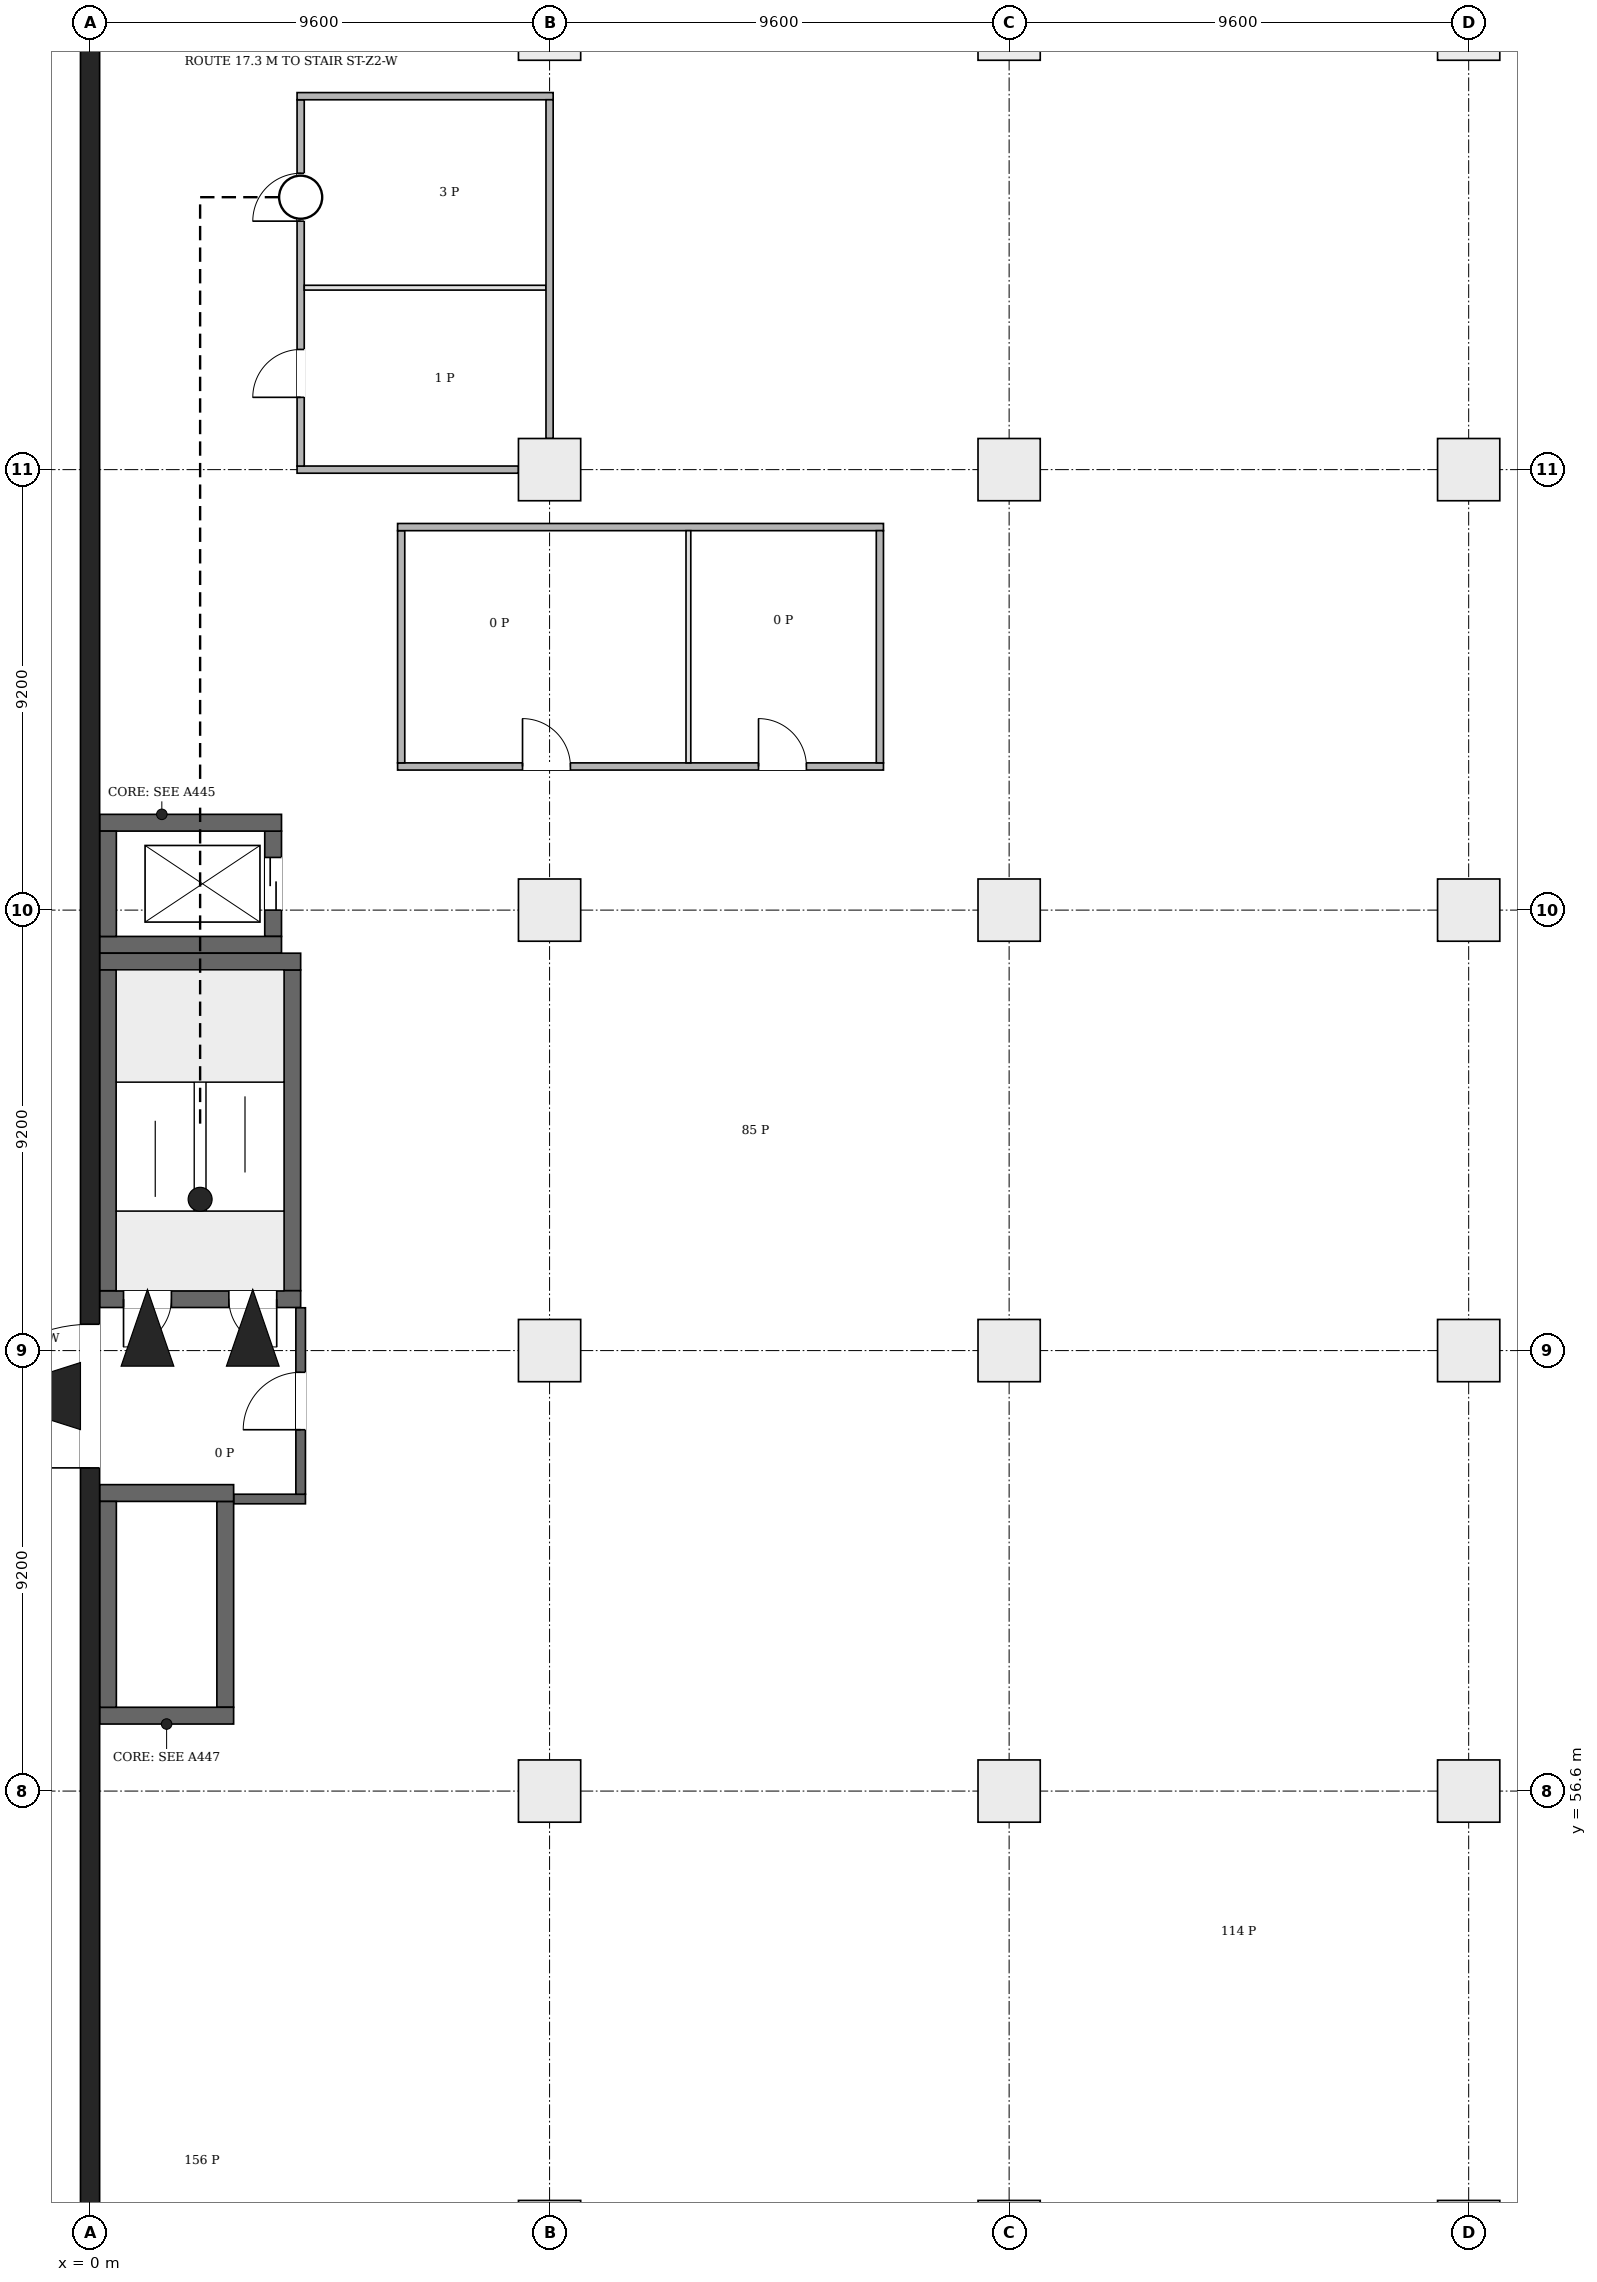
"""IFC4 building model, lengths in metres.
Left out: names, types, materials, properties, quantities, classifications, styles, units other than length and angle.
Written with IfcOpenShell. Run it as: python <this file> out.ifc"""

import sys

from ifc_helpers import new_model, si_unit, direction, frame, frame_2d, origin, origin_2d, place, context, subcontext, project, spatial, rectangle, extrude, element, fill, save


model = new_model("IFC4")
c1 = context("Model", 3, precision=1e-05, world=origin(), true_north=direction((0.0, 1.0)))
c2 = subcontext(c1, "Body", "Model", "MODEL_VIEW")
j1 = project(units=[si_unit("LENGTHUNIT", "METRE"), si_unit("PLANEANGLEUNIT", "RADIAN")], contexts=[c1])
p1 = place(None, origin())
s1 = spatial("IfcSite", under=j1, at=p1, CompositionType="ELEMENT")
p2 = place(p1, origin())
s2 = spatial("IfcBuilding", under=s1, at=p2, CompositionType="ELEMENT")
p3 = place(p2, origin())
s3 = spatial("IfcBuildingStorey", under=s2, at=p3, CompositionType="ELEMENT", Elevation=0.0)
p4 = place(p3, frame((0.0, 46.72, 0.0), z_axis=(0.0, 0.0, 1.0), x_axis=(0.0, 1.0, 0.0)))
e1 = element("IfcWall", 1, at=p4, inside=s3, PredefinedType="SHEAR", context=c2, shape_type="SweptSolid", body=[
    extrude(rectangle(XDim=47.36, YDim=0.4, at=frame_2d((23.68, 0.0))), origin(), (0.0, 0.0, 1.0), 6.5),
])
p5 = place(p4, frame((16.63, 0.0, 0.0)))
e2 = element("IfcOpeningElement", 2, at=p5, cuts=e1, PredefinedType="OPENING", context=c2, shape_type="SweptSolid", body=[
    extrude(rectangle(XDim=3.0, YDim=2.4, at=frame_2d((1.5, 1.2))), frame((0.0, 0.21, 0.0), z_axis=(0.0, -1.0, 0.0), x_axis=(1.0, 0.0, 0.0)), (0.0, 0.0, 1.0), 0.42),
])
p6 = place(p3, frame((0.2, 66.875, 0.0), z_axis=(0.0, 0.0, 1.0), x_axis=(1.0, 0.0, 0.0)))
e3 = element("IfcWall", 3, at=p6, inside=s3, PredefinedType="SHEAR", context=c2, shape_type="SweptSolid", body=[
    extrude(rectangle(XDim=4.2, YDim=0.35, at=frame_2d((2.1, 0.0))), origin(), (0.0, 0.0, 1.0), 6.5),
])
p7 = place(p6, frame((0.5, 0.0, 0.0)))
e4 = element("IfcOpeningElement", 4, at=p7, cuts=e3, PredefinedType="OPENING", context=c2, shape_type="SweptSolid", body=[
    extrude(rectangle(XDim=1.0, YDim=2.1, at=frame_2d((0.5, 1.05))), frame((0.0, 0.185, 0.0), z_axis=(0.0, -1.0, 0.0), x_axis=(1.0, 0.0, 0.0)), (0.0, 0.0, 1.0), 0.37),
])
p8 = place(p6, frame((2.7, 0.0, 0.0)))
e5 = element("IfcOpeningElement", 5, at=p8, cuts=e3, PredefinedType="OPENING", context=c2, shape_type="SweptSolid", body=[
    extrude(rectangle(XDim=1.0, YDim=2.1, at=frame_2d((0.5, 1.05))), frame((0.0, 0.185, 0.0), z_axis=(0.0, -1.0, 0.0), x_axis=(1.0, 0.0, 0.0)), (0.0, 0.0, 1.0), 0.37),
])
p9 = place(p3, frame((0.2, 73.925, 0.0), z_axis=(0.0, 0.0, 1.0), x_axis=(1.0, 0.0, 0.0)))
e6 = element("IfcWall", 6, at=p9, inside=s3, PredefinedType="SHEAR", context=c2, shape_type="SweptSolid", body=[
    extrude(rectangle(XDim=4.2, YDim=0.35, at=frame_2d((2.1, 0.0))), origin(), (0.0, 0.0, 1.0), 6.5),
])
for number, where, z_axis, x_axis in (
    (7, (0.375, 67.05, 0.0), (0.0, 0.0, 1.0), (0.0, 1.0, 0.0)),
    (8, (4.225, 67.05, 0.0), (0.0, 0.0, 1.0), (0.0, 1.0, 0.0)),
):
    element("IfcWall", number, at=place(p3, frame(where, z_axis=z_axis, x_axis=x_axis)), inside=s3, PredefinedType="SHEAR", context=c2, shape_type="SweptSolid", body=[
        extrude(rectangle(XDim=6.7, YDim=0.35, at=frame_2d((3.35, 0.0))), origin(), (0.0, 0.0, 1.0), 6.5),
    ])
for number, where, z_axis, x_axis in (
    (9, (0.2, 74.275, 0.0), (0.0, 0.0, 1.0), (1.0, 0.0, 0.0)),
    (10, (0.2, 76.825, 0.0), (0.0, 0.0, 1.0), (1.0, 0.0, 0.0)),
):
    element("IfcWall", number, at=place(p3, frame(where, z_axis=z_axis, x_axis=x_axis)), inside=s3, PredefinedType="SHEAR", context=c2, shape_type="SweptSolid", body=[
        extrude(rectangle(XDim=3.8, YDim=0.35, at=frame_2d((1.9, 0.0))), origin(), (0.0, 0.0, 1.0), 6.5),
    ])
p10 = place(p3, frame((0.375, 74.45, 0.0), z_axis=(0.0, 0.0, 1.0), x_axis=(0.0, 1.0, 0.0)))
e11 = element("IfcWall", 11, at=p10, inside=s3, PredefinedType="SHEAR", context=c2, shape_type="SweptSolid", body=[
    extrude(rectangle(XDim=2.2, YDim=0.35, at=frame_2d((1.1, 0.0))), origin(), (0.0, 0.0, 1.0), 6.5),
])
p11 = place(p3, frame((3.825, 74.45, 0.0), z_axis=(0.0, 0.0, 1.0), x_axis=(0.0, 1.0, 0.0)))
e12 = element("IfcWall", 12, at=p11, inside=s3, PredefinedType="SHEAR", context=c2, shape_type="SweptSolid", body=[
    extrude(rectangle(XDim=2.2, YDim=0.35, at=frame_2d((1.1, 0.0))), origin(), (0.0, 0.0, 1.0), 6.5),
])
p12 = place(p11, frame((0.55, 0.0, 0.0)))
e13 = element("IfcOpeningElement", 13, at=p12, cuts=e12, PredefinedType="OPENING", context=c2, shape_type="SweptSolid", body=[
    extrude(rectangle(XDim=1.1, YDim=2.1, at=frame_2d((0.55, 1.05))), frame((0.0, 0.185, 0.0), z_axis=(0.0, -1.0, 0.0), x_axis=(1.0, 0.0, 0.0)), (0.0, 0.0, 1.0), 0.37),
])
for number, where, z_axis, x_axis in (
    (14, (0.2, 58.175, 0.0), (0.0, 0.0, 1.0), (1.0, 0.0, 0.0)),
    (15, (0.2, 62.825, 0.0), (0.0, 0.0, 1.0), (1.0, 0.0, 0.0)),
):
    element("IfcWall", number, at=place(p3, frame(where, z_axis=z_axis, x_axis=x_axis)), inside=s3, PredefinedType="SHEAR", context=c2, shape_type="SweptSolid", body=[
        extrude(rectangle(XDim=2.8, YDim=0.35, at=frame_2d((1.4, 0.0))), origin(), (0.0, 0.0, 1.0), 6.5),
    ])
for number, where, z_axis, x_axis in (
    (16, (0.375, 58.35, 0.0), (0.0, 0.0, 1.0), (0.0, 1.0, 0.0)),
    (17, (2.825, 58.35, 0.0), (0.0, 0.0, 1.0), (0.0, 1.0, 0.0)),
):
    element("IfcWall", number, at=place(p3, frame(where, z_axis=z_axis, x_axis=x_axis)), inside=s3, PredefinedType="SHEAR", context=c2, shape_type="SweptSolid", body=[
        extrude(rectangle(XDim=4.3, YDim=0.35, at=frame_2d((2.15, 0.0))), origin(), (0.0, 0.0, 1.0), 6.5),
    ])
for number, where, z_axis, x_axis in (
    (18, (9.6, 47.4, 0.0), (0.0, 0.0, 1.0), (1.0, 0.0, 0.0)),
    (19, (19.2, 47.4, 0.0), (0.0, 0.0, 1.0), (1.0, 0.0, 0.0)),
    (20, (28.8, 47.4, 0.0), (0.0, 0.0, 1.0), (1.0, 0.0, 0.0)),
    (21, (9.6, 56.6, 0.0), (0.0, 0.0, 1.0), (1.0, 0.0, 0.0)),
    (22, (19.2, 56.6, 0.0), (0.0, 0.0, 1.0), (1.0, 0.0, 0.0)),
    (23, (28.8, 56.6, 0.0), (0.0, 0.0, 1.0), (1.0, 0.0, 0.0)),
    (24, (9.6, 65.8, 0.0), (0.0, 0.0, 1.0), (1.0, 0.0, 0.0)),
    (25, (19.2, 65.8, 0.0), (0.0, 0.0, 1.0), (1.0, 0.0, 0.0)),
    (26, (28.8, 65.8, 0.0), (0.0, 0.0, 1.0), (1.0, 0.0, 0.0)),
    (27, (9.6, 75.0, 0.0), (0.0, 0.0, 1.0), (1.0, 0.0, 0.0)),
    (28, (19.2, 75.0, 0.0), (0.0, 0.0, 1.0), (1.0, 0.0, 0.0)),
    (29, (28.8, 75.0, 0.0), (0.0, 0.0, 1.0), (1.0, 0.0, 0.0)),
    (30, (9.6, 84.2, 0.0), (0.0, 0.0, 1.0), (1.0, 0.0, 0.0)),
    (31, (19.2, 84.2, 0.0), (0.0, 0.0, 1.0), (1.0, 0.0, 0.0)),
    (32, (28.8, 84.2, 0.0), (0.0, 0.0, 1.0), (1.0, 0.0, 0.0)),
    (33, (9.6, 93.4, 0.0), (0.0, 0.0, 1.0), (1.0, 0.0, 0.0)),
    (34, (19.2, 93.4, 0.0), (0.0, 0.0, 1.0), (1.0, 0.0, 0.0)),
    (35, (28.8, 93.4, 0.0), (0.0, 0.0, 1.0), (1.0, 0.0, 0.0)),
):
    element("IfcColumn", number, at=place(p3, frame(where, z_axis=z_axis, x_axis=x_axis)), inside=s3, PredefinedType="COLUMN", context=c2, shape_type="SweptSolid", body=[
        extrude(rectangle(XDim=1.3, YDim=1.3, at=origin_2d()), origin(), (0.0, 0.0, 1.0), 6.5),
    ])
p13 = place(p3, frame((3.006, 62.7, 0.0), z_axis=(0.0, 0.0, 1.0), x_axis=(1.0, 0.0, 0.0)))
e36 = element("IfcWall", 36, at=p13, inside=s3, PredefinedType="PARTITIONING", context=c2, shape_type="SweptSolid", body=[
    extrude(rectangle(XDim=1.494, YDim=0.2, at=frame_2d((0.747, 0.0))), origin(), (0.0, 0.0, 1.0), 6.05),
])
p14 = place(p3, frame((4.4, 62.8, 0.0), z_axis=(0.0, 0.0, 1.0), x_axis=(0.0, 1.0, 0.0)))
e37 = element("IfcWall", 37, at=p14, inside=s3, PredefinedType="PARTITIONING", context=c2, shape_type="SweptSolid", body=[
    extrude(rectangle(XDim=3.894, YDim=0.2, at=frame_2d((1.947, 0.0))), origin(), (0.0, 0.0, 1.0), 6.05),
])
p15 = place(p14, frame((1.347, 0.0, 0.0)))
e38 = element("IfcOpeningElement", 38, at=p15, cuts=e37, PredefinedType="OPENING", context=c2, shape_type="SweptSolid", body=[
    extrude(rectangle(XDim=1.2, YDim=2.1, at=frame_2d((0.6, 1.05))), frame((0.0, 0.11, 0.0), z_axis=(0.0, -1.0, 0.0), x_axis=(1.0, 0.0, 0.0)), (0.0, 0.0, 1.0), 0.22),
])
p16 = place(p3, frame((4.325, 84.2, 0.0), z_axis=(0.0, 0.0, 1.0), x_axis=(1.0, 0.0, 0.0)))
e39 = element("IfcWall", 39, at=p16, inside=s3, PredefinedType="PARTITIONING", context=c2, shape_type="SweptSolid", body=[
    extrude(rectangle(XDim=4.625, YDim=0.15, at=frame_2d((2.312, 0.0))), origin(), (0.0, 0.0, 1.0), 5.65),
])
p17 = place(p3, frame((4.4, 84.275, 0.0), z_axis=(0.0, 0.0, 1.0), x_axis=(0.0, 1.0, 0.0)))
e40 = element("IfcWall", 40, at=p17, inside=s3, PredefinedType="PARTITIONING", context=c2, shape_type="SweptSolid", body=[
    extrude(rectangle(XDim=7.65, YDim=0.15, at=frame_2d((3.825, 0.0))), origin(), (0.0, 0.0, 1.0), 6.05),
])
p18 = place(p17, frame((1.435, 0.0, 0.0)))
e41 = element("IfcOpeningElement", 41, at=p18, cuts=e40, PredefinedType="OPENING", context=c2, shape_type="SweptSolid", body=[
    extrude(rectangle(XDim=1.0, YDim=2.1, at=frame_2d((0.5, 1.05))), frame((0.0, 0.085, 0.0), z_axis=(0.0, -1.0, 0.0), x_axis=(1.0, 0.0, 0.0)), (0.0, 0.0, 1.0), 0.17),
])
p19 = place(p17, frame((5.115, 0.0, 0.0)))
e42 = element("IfcOpeningElement", 42, at=p19, cuts=e40, PredefinedType="OPENING", context=c2, shape_type="SweptSolid", body=[
    extrude(rectangle(XDim=1.0, YDim=2.1, at=frame_2d((0.5, 1.05))), frame((0.0, 0.085, 0.0), z_axis=(0.0, -1.0, 0.0), x_axis=(1.0, 0.0, 0.0)), (0.0, 0.0, 1.0), 0.17),
])
p20 = place(p3, frame((4.325, 92.0, 0.0), z_axis=(0.0, 0.0, 1.0), x_axis=(1.0, 0.0, 0.0)))
e43 = element("IfcWall", 43, at=p20, inside=s3, PredefinedType="PARTITIONING", context=c2, shape_type="SweptSolid", body=[
    extrude(rectangle(XDim=5.35, YDim=0.15, at=frame_2d((2.675, 0.0))), origin(), (0.0, 0.0, 1.0), 6.05),
])
p21 = place(p3, frame((4.475, 88.0, 0.0), z_axis=(0.0, 0.0, 1.0), x_axis=(1.0, 0.0, 0.0)))
e44 = element("IfcWall", 44, at=p21, inside=s3, PredefinedType="PARTITIONING", context=c2, shape_type="SweptSolid", body=[
    extrude(rectangle(XDim=5.05, YDim=0.1, at=frame_2d((2.525, 0.0))), origin(), (0.0, 0.0, 1.0), 6.05),
])
p22 = place(p3, frame((6.425, 78.0, 0.0), z_axis=(0.0, 0.0, 1.0), x_axis=(1.0, 0.0, 0.0)))
e45 = element("IfcWall", 45, at=p22, inside=s3, PredefinedType="PARTITIONING", context=c2, shape_type="SweptSolid", body=[
    extrude(rectangle(XDim=10.15, YDim=0.15, at=frame_2d((5.075, 0.0))), origin(), (0.0, 0.0, 1.0), 6.05),
])
p23 = place(p22, frame((2.61, 0.0, 0.0)))
e46 = element("IfcOpeningElement", 46, at=p23, cuts=e45, PredefinedType="OPENING", context=c2, shape_type="SweptSolid", body=[
    extrude(rectangle(XDim=1.0, YDim=2.1, at=frame_2d((0.5, 1.05))), frame((0.0, 0.085, 0.0), z_axis=(0.0, -1.0, 0.0), x_axis=(1.0, 0.0, 0.0)), (0.0, 0.0, 1.0), 0.17),
])
p24 = place(p22, frame((7.54, 0.0, 0.0)))
e47 = element("IfcOpeningElement", 47, at=p24, cuts=e45, PredefinedType="OPENING", context=c2, shape_type="SweptSolid", body=[
    extrude(rectangle(XDim=1.0, YDim=2.1, at=frame_2d((0.5, 1.05))), frame((0.0, 0.085, 0.0), z_axis=(0.0, -1.0, 0.0), x_axis=(1.0, 0.0, 0.0)), (0.0, 0.0, 1.0), 0.17),
])
p25 = place(p3, frame((6.5, 78.075, 0.0), z_axis=(0.0, 0.0, 1.0), x_axis=(0.0, 1.0, 0.0)))
e48 = element("IfcWall", 48, at=p25, inside=s3, PredefinedType="PARTITIONING", context=c2, shape_type="SweptSolid", body=[
    extrude(rectangle(XDim=4.85, YDim=0.15, at=frame_2d((2.425, 0.0))), origin(), (0.0, 0.0, 1.0), 6.05),
])
p26 = place(p3, frame((6.425, 83.0, 0.0), z_axis=(0.0, 0.0, 1.0), x_axis=(1.0, 0.0, 0.0)))
e49 = element("IfcWall", 49, at=p26, inside=s3, PredefinedType="PARTITIONING", context=c2, shape_type="SweptSolid", body=[
    extrude(rectangle(XDim=10.15, YDim=0.15, at=frame_2d((5.075, 0.0))), origin(), (0.0, 0.0, 1.0), 6.05),
])
p27 = place(p3, frame((9.6, 84.85, 0.0), z_axis=(0.0, 0.0, 1.0), x_axis=(0.0, 1.0, 0.0)))
e50 = element("IfcWall", 50, at=p27, inside=s3, PredefinedType="PARTITIONING", context=c2, shape_type="SweptSolid", body=[
    extrude(rectangle(XDim=7.075, YDim=0.15, at=frame_2d((3.538, 0.0))), origin(), (0.0, 0.0, 1.0), 5.65),
])
p28 = place(p3, frame((12.5, 78.075, 0.0), z_axis=(0.0, 0.0, 1.0), x_axis=(0.0, 1.0, 0.0)))
e51 = element("IfcWall", 51, at=p28, inside=s3, PredefinedType="PARTITIONING", context=c2, shape_type="SweptSolid", body=[
    extrude(rectangle(XDim=4.85, YDim=0.1, at=frame_2d((2.425, 0.0))), origin(), (0.0, 0.0, 1.0), 6.05),
])
p29 = place(p3, frame((16.5, 78.075, 0.0), z_axis=(0.0, 0.0, 1.0), x_axis=(0.0, 1.0, 0.0)))
e52 = element("IfcWall", 52, at=p29, inside=s3, PredefinedType="PARTITIONING", context=c2, shape_type="SweptSolid", body=[
    extrude(rectangle(XDim=4.85, YDim=0.15, at=frame_2d((2.425, 0.0))), origin(), (0.0, 0.0, 1.0), 6.05),
])
p30 = place(p5, origin())
e53 = element("IfcDoor", 53, at=p30, inside=s3, OperationType="DOUBLE_DOOR_SINGLE_SWING", PredefinedType="DOOR", context=c2, shape_type="SweptSolid", body=[
    extrude(rectangle(XDim=3.0, YDim=2.4, at=frame_2d((1.5, 1.2))), frame((0.0, 0.025, 0.0), z_axis=(0.0, -1.0, 0.0), x_axis=(1.0, 0.0, 0.0)), (0.0, 0.0, 1.0), 0.05),
])
fill(e2, e53)
p31 = place(p7, origin())
e54 = element("IfcDoor", 54, at=p31, inside=s3, OperationType="SINGLE_SWING_LEFT", PredefinedType="DOOR", context=c2, shape_type="SweptSolid", body=[
    extrude(rectangle(XDim=1.0, YDim=2.1, at=frame_2d((0.5, 1.05))), frame((0.0, 0.025, 0.0), z_axis=(0.0, -1.0, 0.0), x_axis=(1.0, 0.0, 0.0)), (0.0, 0.0, 1.0), 0.05),
])
fill(e4, e54)
p32 = place(p8, origin())
e55 = element("IfcDoor", 55, at=p32, inside=s3, OperationType="SINGLE_SWING_RIGHT", PredefinedType="DOOR", context=c2, shape_type="SweptSolid", body=[
    extrude(rectangle(XDim=1.0, YDim=2.1, at=frame_2d((0.5, 1.05))), frame((0.0, 0.025, 0.0), z_axis=(0.0, -1.0, 0.0), x_axis=(1.0, 0.0, 0.0)), (0.0, 0.0, 1.0), 0.05),
])
fill(e5, e55)
p33 = place(p12, origin())
e56 = element("IfcDoor", 56, at=p33, inside=s3, OperationType="DOUBLE_DOOR_SLIDING", PredefinedType="DOOR", context=c2, shape_type="SweptSolid", body=[
    extrude(rectangle(XDim=1.1, YDim=2.1, at=frame_2d((0.55, 1.05))), frame((0.0, 0.025, 0.0), z_axis=(0.0, -1.0, 0.0), x_axis=(1.0, 0.0, 0.0)), (0.0, 0.0, 1.0), 0.05),
])
fill(e13, e56)
p34 = place(p23, origin())
e57 = element("IfcDoor", 57, at=p34, inside=s3, OperationType="SINGLE_SWING_LEFT", PredefinedType="DOOR", context=c2, shape_type="SweptSolid", body=[
    extrude(rectangle(XDim=1.0, YDim=2.1, at=frame_2d((0.5, 1.05))), frame((0.0, 0.025, 0.0), z_axis=(0.0, -1.0, 0.0), x_axis=(1.0, 0.0, 0.0)), (0.0, 0.0, 1.0), 0.05),
])
fill(e46, e57)
p35 = place(p24, origin())
e58 = element("IfcDoor", 58, at=p35, inside=s3, OperationType="SINGLE_SWING_RIGHT", PredefinedType="DOOR", context=c2, shape_type="SweptSolid", body=[
    extrude(rectangle(XDim=1.0, YDim=2.1, at=frame_2d((0.5, 1.05))), frame((0.0, 0.025, 0.0), z_axis=(0.0, -1.0, 0.0), x_axis=(1.0, 0.0, 0.0)), (0.0, 0.0, 1.0), 0.05),
])
fill(e47, e58)
p36 = place(p18, origin())
e59 = element("IfcDoor", 59, at=p36, inside=s3, OperationType="SINGLE_SWING_RIGHT", PredefinedType="DOOR", context=c2, shape_type="SweptSolid", body=[
    extrude(rectangle(XDim=1.0, YDim=2.1, at=frame_2d((0.5, 1.05))), frame((0.0, 0.025, 0.0), z_axis=(0.0, -1.0, 0.0), x_axis=(1.0, 0.0, 0.0)), (0.0, 0.0, 1.0), 0.05),
])
fill(e41, e59)
p37 = place(p19, origin())
e60 = element("IfcDoor", 60, at=p37, inside=s3, OperationType="SINGLE_SWING_LEFT", PredefinedType="DOOR", context=c2, shape_type="SweptSolid", body=[
    extrude(rectangle(XDim=1.0, YDim=2.1, at=frame_2d((0.5, 1.05))), frame((0.0, 0.025, 0.0), z_axis=(0.0, -1.0, 0.0), x_axis=(1.0, 0.0, 0.0)), (0.0, 0.0, 1.0), 0.05),
])
fill(e42, e60)
p38 = place(p15, origin())
e61 = element("IfcDoor", 61, at=p38, inside=s3, OperationType="SINGLE_SWING_LEFT", PredefinedType="DOOR", context=c2, shape_type="SweptSolid", body=[
    extrude(rectangle(XDim=1.2, YDim=2.1, at=frame_2d((0.6, 1.05))), frame((0.0, 0.025, 0.0), z_axis=(0.0, -1.0, 0.0), x_axis=(1.0, 0.0, 0.0)), (0.0, 0.0, 1.0), 0.05),
])
fill(e38, e61)
save(model, sys.argv[1])
